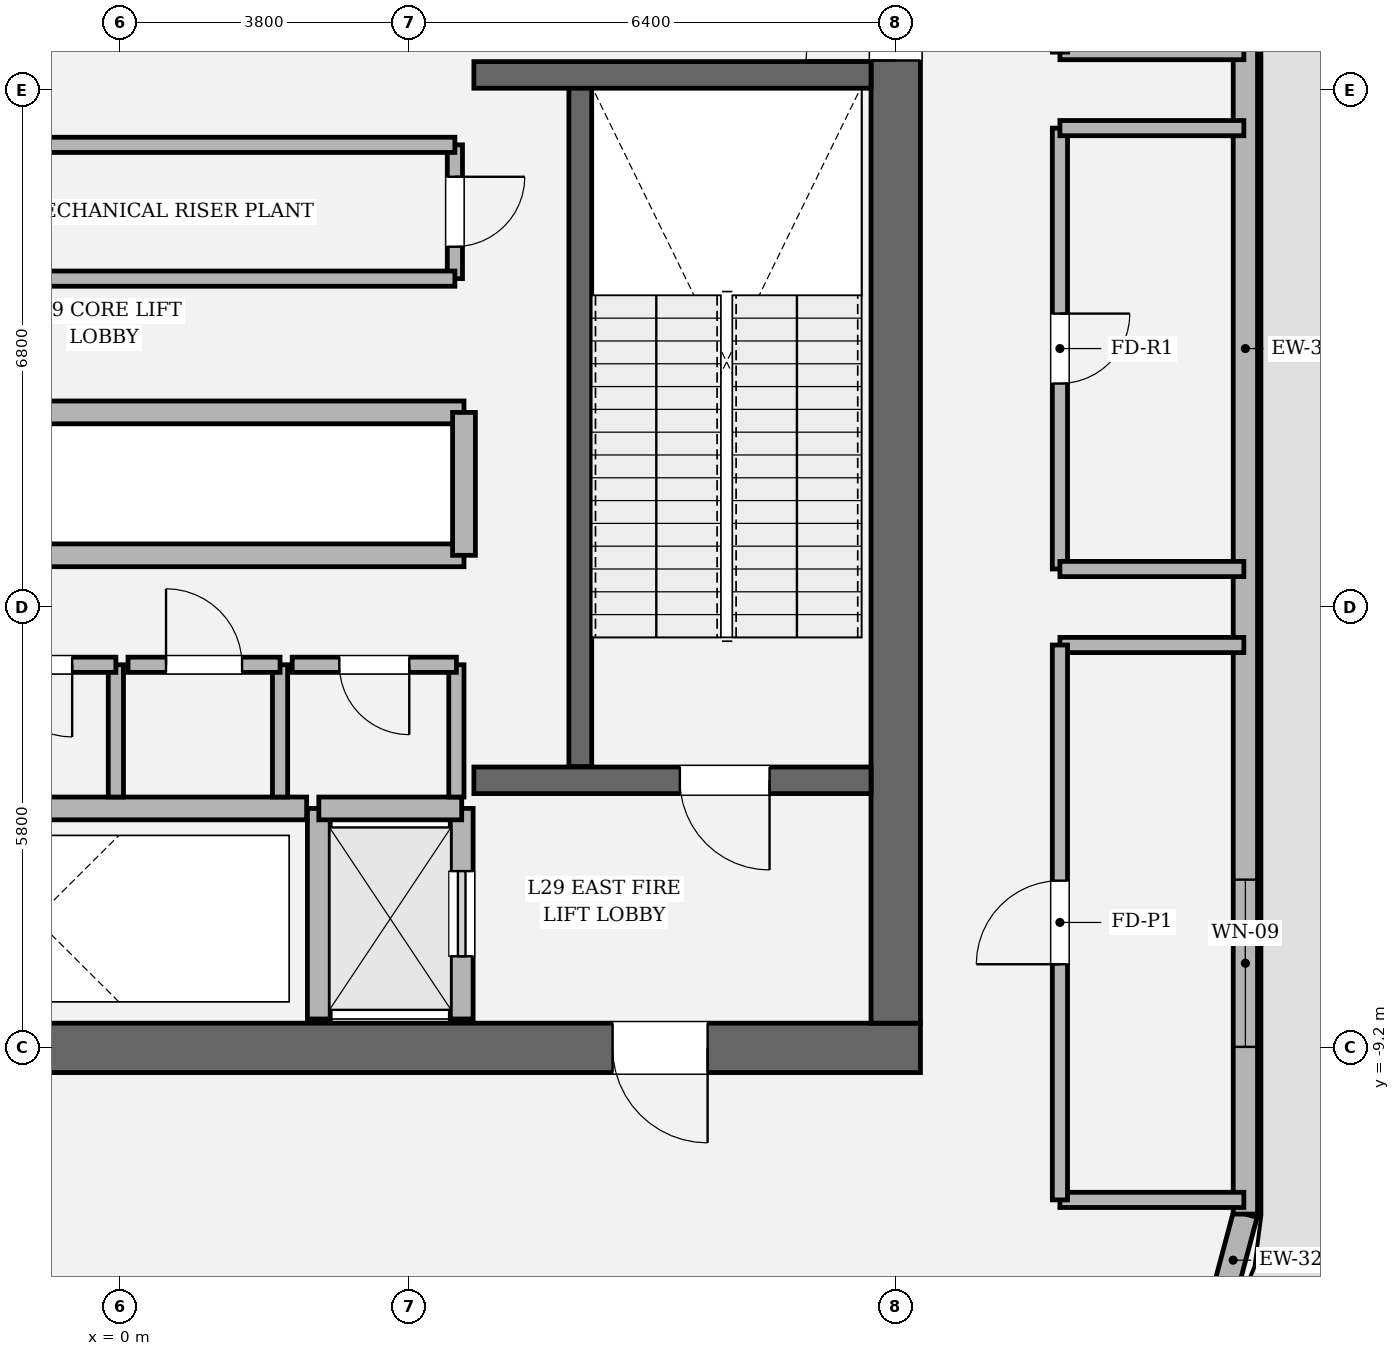
"""IFC4 building model, lengths in metres.
Left out: names, types, materials, properties, quantities, classifications, styles, units other than length and angle.
Written with IfcOpenShell. Run it as: python <this file> out.ifc"""

import sys

from ifc_helpers import new_model, si_unit, direction, frame, frame_2d, origin, place, context, subcontext, project, spatial, rectangle, extrude, element, fill, save


model = new_model("IFC4")
c1 = context("Model", 3, precision=1e-05, world=origin(), true_north=direction((0.0, 1.0)))
c2 = subcontext(c1, "Body", "Model", "MODEL_VIEW")
j1 = project(units=[si_unit("LENGTHUNIT", "METRE"), si_unit("PLANEANGLEUNIT", "RADIAN")], contexts=[c1])
p1 = place(None, origin())
s1 = spatial("IfcSite", under=j1, at=p1, CompositionType="ELEMENT")
p2 = place(p1, origin())
s2 = spatial("IfcBuilding", under=s1, at=p2, CompositionType="ELEMENT")
p3 = place(p2, frame((0.0, 0.0, 125.4)))
s3 = spatial("IfcBuildingStorey", under=s2, at=p3, CompositionType="ELEMENT", Elevation=125.4)
p4 = place(p3, frame((10.525, -9.2, 0.0), z_axis=(0.0, 0.0, 1.0), x_axis=(-1.0, 0.0, 0.0)))
e1 = element("IfcWall", 1, at=p4, inside=s3, PredefinedType="SHEAR", context=c2, shape_type="SweptSolid", body=[
    extrude(rectangle(XDim=21.05, YDim=0.65, at=frame_2d((10.525, 0.0))), origin(), (0.0, 0.0, 1.0), 4.8),
])
p5 = place(p4, frame((2.8, 0.0, 0.0)))
e2 = element("IfcOpeningElement", 2, at=p5, cuts=e1, PredefinedType="OPENING", context=c2, shape_type="SweptSolid", body=[
    extrude(rectangle(XDim=1.25, YDim=2.25, at=frame_2d((0.625, 1.125))), frame((0.0, 0.335, 0.0), z_axis=(0.0, -1.0, 0.0), x_axis=(1.0, 0.0, 0.0)), (0.0, 0.0, 1.0), 0.67),
])
p6 = place(p4, frame((17.0, 0.0, 0.0)))
e3 = element("IfcOpeningElement", 3, at=p6, cuts=e1, PredefinedType="OPENING", context=c2, shape_type="SweptSolid", body=[
    extrude(rectangle(XDim=1.25, YDim=2.25, at=frame_2d((0.625, 1.125))), frame((0.0, 0.335, 0.0), z_axis=(0.0, -1.0, 0.0), x_axis=(1.0, 0.0, 0.0)), (0.0, 0.0, 1.0), 0.67),
])
p7 = place(p3, frame((10.2, 8.875, 0.0), z_axis=(0.0, 0.0, 1.0), x_axis=(0.0, -1.0, 0.0)))
e4 = element("IfcWall", 4, at=p7, inside=s3, PredefinedType="SHEAR", context=c2, shape_type="SweptSolid", body=[
    extrude(rectangle(XDim=17.75, YDim=0.65, at=frame_2d((8.875, 0.0))), origin(), (0.0, 0.0, 1.0), 4.8),
])
p8 = place(p7, frame((3.905, 0.0, 0.0)))
e5 = element("IfcOpeningElement", 5, at=p8, cuts=e4, PredefinedType="OPENING", context=c2, shape_type="SweptSolid", body=[
    extrude(rectangle(XDim=1.18, YDim=2.2, at=frame_2d((0.59, 1.1))), frame((0.0, 0.335, 0.0), z_axis=(0.0, -1.0, 0.0), x_axis=(1.0, 0.0, 0.0)), (0.0, 0.0, 1.0), 0.67),
])
p9 = place(p3, frame((6.05, 3.45, 0.0), z_axis=(0.0, 0.0, 1.0), x_axis=(0.0, -1.0, 0.0)))
e6 = element("IfcWall", 6, at=p9, inside=s3, PredefinedType="SOLIDWALL", context=c2, shape_type="SweptSolid", body=[
    extrude(rectangle(XDim=8.95, YDim=0.3, at=frame_2d((4.475, 0.0))), origin(), (0.0, 0.0, 1.0), 4.8),
])
p10 = place(p3, frame((4.65, -5.68, 0.0), z_axis=(0.0, 0.0, 1.0), x_axis=(1.0, 0.0, 0.0)))
e7 = element("IfcWall", 7, at=p10, inside=s3, PredefinedType="SOLIDWALL", context=c2, shape_type="SweptSolid", body=[
    extrude(rectangle(XDim=5.225, YDim=0.35, at=frame_2d((2.613, 0.0))), origin(), (0.0, 0.0, 1.0), 4.8),
])
p11 = place(p10, frame((2.71, 0.0, 0.0)))
e8 = element("IfcOpeningElement", 8, at=p11, cuts=e7, PredefinedType="OPENING", context=c2, shape_type="SweptSolid", body=[
    extrude(rectangle(XDim=1.18, YDim=2.2, at=frame_2d((0.59, 1.1))), frame((0.0, 0.185, 0.0), z_axis=(0.0, -1.0, 0.0), x_axis=(1.0, 0.0, 0.0)), (0.0, 0.0, 1.0), 0.37),
])
p12 = place(p3, frame((4.65, 3.6, 0.0), z_axis=(0.0, 0.0, 1.0), x_axis=(1.0, 0.0, 0.0)))
e9 = element("IfcWall", 9, at=p12, inside=s3, PredefinedType="SOLIDWALL", context=c2, shape_type="SweptSolid", body=[
    extrude(rectangle(XDim=5.225, YDim=0.35, at=frame_2d((2.613, 0.0))), origin(), (0.0, 0.0, 1.0), 4.8),
])
p13 = place(p3, frame((14.477, -12.599, 0.0), z_axis=(0.0, 0.0, 1.0), x_axis=(0.25748094776, 0.966283375382, 0.0)))
e10 = element("IfcWall", 10, at=p13, inside=s3, PredefinedType="SOLIDWALL", context=c2, shape_type="SweptSolid", body=[
    extrude(rectangle(XDim=1.254, YDim=0.32, at=frame_2d((0.627, 0.0))), origin(), (0.0, 0.0, 1.0), 3.194),
])
p14 = place(p3, frame((14.8, -11.387, 0.0), z_axis=(0.0, 0.0, 1.0), x_axis=(0.0, 1.0, 0.0)))
e11 = element("IfcWall", 11, at=p14, inside=s3, PredefinedType="SOLIDWALL", context=c2, shape_type="SweptSolid", body=[
    extrude(rectangle(XDim=22.774, YDim=0.32, at=frame_2d((11.387, 0.0))), origin(), (0.0, 0.0, 1.0), 3.194),
])
p15 = place(p14, frame((2.2, 0.0, 0.9)))
e12 = element("IfcOpeningElement", 12, at=p15, cuts=e11, PredefinedType="OPENING", context=c2, shape_type="SweptSolid", body=[
    extrude(rectangle(XDim=2.2, YDim=1.2, at=frame_2d((1.1, 0.6))), frame((0.0, 0.17, 0.0), z_axis=(0.0, -1.0, 0.0), x_axis=(1.0, 0.0, 0.0)), (0.0, 0.0, 1.0), 0.34),
])
p16 = place(p14, frame((18.374, 0.0, 0.9)))
e13 = element("IfcOpeningElement", 13, at=p16, cuts=e11, PredefinedType="OPENING", context=c2, shape_type="SweptSolid", body=[
    extrude(rectangle(XDim=2.2, YDim=1.2, at=frame_2d((1.1, 0.6))), frame((0.0, 0.17, 0.0), z_axis=(0.0, -1.0, 0.0), x_axis=(1.0, 0.0, 0.0)), (0.0, 0.0, 1.0), 0.34),
])
p17 = place(p3, frame((4.49, -8.82, 0.0), z_axis=(0.0, 0.0, 1.0), x_axis=(0.0, 1.0, 0.0)))
e14 = element("IfcWall", 14, at=p17, inside=s3, PredefinedType="SOLIDWALL", context=c2, shape_type="SweptSolid", body=[
    extrude(rectangle(XDim=2.77, YDim=0.3, at=frame_2d((1.385, 0.0))), origin(), (0.0, 0.0, 1.0), 4.48),
])
p18 = place(p17, frame((0.825, 0.0, 0.0)))
e15 = element("IfcOpeningElement", 15, at=p18, cuts=e14, PredefinedType="OPENING", context=c2, shape_type="SweptSolid", body=[
    extrude(rectangle(XDim=1.12, YDim=2.25, at=frame_2d((0.56, 1.125))), frame((0.0, 0.16, 0.0), z_axis=(0.0, -1.0, 0.0), x_axis=(1.0, 0.0, 0.0)), (0.0, 0.0, 1.0), 0.32),
])
p19 = place(p3, frame((2.61, -8.82, 0.0), z_axis=(0.0, 0.0, 1.0), x_axis=(0.0, 1.0, 0.0)))
e16 = element("IfcWall", 16, at=p19, inside=s3, PredefinedType="SOLIDWALL", context=c2, shape_type="SweptSolid", body=[
    extrude(rectangle(XDim=2.77, YDim=0.3, at=frame_2d((1.385, 0.0))), origin(), (0.0, 0.0, 1.0), 4.48),
])
p20 = place(p3, frame((2.61, -6.05, 0.0), z_axis=(0.0, 0.0, 1.0), x_axis=(1.0, 0.0, 0.0)))
e17 = element("IfcWall", 17, at=p20, inside=s3, PredefinedType="SOLIDWALL", context=c2, shape_type="SweptSolid", body=[
    extrude(rectangle(XDim=1.88, YDim=0.3, at=frame_2d((0.94, 0.0))), origin(), (0.0, 0.0, 1.0), 4.48),
])
for number, where, z_axis, x_axis in (
    (18, (-4.52, -0.84, 0.0), (0.0, 0.0, 1.0), (1.0, 0.0, 0.0)),
    (19, (-4.52, -2.72, 0.0), (0.0, 0.0, 1.0), (1.0, 0.0, 0.0)),
):
    element("IfcWall", number, at=place(p3, frame(where, z_axis=z_axis, x_axis=x_axis)), inside=s3, PredefinedType="SOLIDWALL", context=c2, shape_type="SweptSolid", body=[
        extrude(rectangle(XDim=9.04, YDim=0.3, at=frame_2d((4.52, 0.0))), origin(), (0.0, 0.0, 1.0), 4.48),
    ])
p21 = place(p3, frame((4.52, -2.72, 0.0), z_axis=(0.0, 0.0, 1.0), x_axis=(0.0, 1.0, 0.0)))
e20 = element("IfcWall", 20, at=p21, inside=s3, PredefinedType="SOLIDWALL", context=c2, shape_type="SweptSolid", body=[
    extrude(rectangle(XDim=1.88, YDim=0.3, at=frame_2d((0.94, 0.0))), origin(), (0.0, 0.0, 1.0), 4.48),
])
p22 = place(p3, frame((-2.45, -6.05, 0.0), z_axis=(0.0, 0.0, 1.0), x_axis=(1.0, 0.0, 0.0)))
e21 = element("IfcWall", 21, at=p22, inside=s3, PredefinedType="SOLIDWALL", context=c2, shape_type="SweptSolid", body=[
    extrude(rectangle(XDim=4.9, YDim=0.3, at=frame_2d((2.45, 0.0))), origin(), (0.0, 0.0, 1.0), 4.48),
])
p23 = place(p3, frame((-0.06, -5.9, 0.0), z_axis=(0.0, 0.0, 1.0), x_axis=(0.0, 1.0, 0.0)))
e22 = element("IfcWall", 22, at=p23, inside=s3, PredefinedType="SOLIDWALL", context=c2, shape_type="SweptSolid", body=[
    extrude(rectangle(XDim=1.74, YDim=0.2, at=frame_2d((0.87, 0.0))), origin(), (0.0, 0.0, 1.0), 4.48),
])
p24 = place(p3, frame((-0.06, -4.16, 0.0), z_axis=(0.0, 0.0, 1.0), x_axis=(-1.0, 0.0, 0.0)))
e23 = element("IfcWall", 23, at=p24, inside=s3, PredefinedType="SOLIDWALL", context=c2, shape_type="SweptSolid", body=[
    extrude(rectangle(XDim=2.1, YDim=0.2, at=frame_2d((1.05, 0.0))), origin(), (0.0, 0.0, 1.0), 4.48),
])
p25 = place(p24, frame((0.575, 0.0, 0.0)))
e24 = element("IfcOpeningElement", 24, at=p25, cuts=e23, PredefinedType="OPENING", context=c2, shape_type="SweptSolid", body=[
    extrude(rectangle(XDim=0.95, YDim=2.15, at=frame_2d((0.475, 1.075))), frame((0.0, 0.11, 0.0), z_axis=(0.0, -1.0, 0.0), x_axis=(1.0, 0.0, 0.0)), (0.0, 0.0, 1.0), 0.22),
])
p26 = place(p3, frame((2.1, -5.9, 0.0), z_axis=(0.0, 0.0, 1.0), x_axis=(0.0, 1.0, 0.0)))
e25 = element("IfcWall", 25, at=p26, inside=s3, PredefinedType="SOLIDWALL", context=c2, shape_type="SweptSolid", body=[
    extrude(rectangle(XDim=1.74, YDim=0.2, at=frame_2d((0.87, 0.0))), origin(), (0.0, 0.0, 1.0), 4.48),
])
p27 = place(p3, frame((2.1, -4.16, 0.0), z_axis=(0.0, 0.0, 1.0), x_axis=(-1.0, 0.0, 0.0)))
e26 = element("IfcWall", 26, at=p27, inside=s3, PredefinedType="SOLIDWALL", context=c2, shape_type="SweptSolid", body=[
    extrude(rectangle(XDim=2.0, YDim=0.2, at=frame_2d((1.0, 0.0))), origin(), (0.0, 0.0, 1.0), 4.48),
])
p28 = place(p27, frame((0.5, 0.0, 0.0)))
e27 = element("IfcOpeningElement", 27, at=p28, cuts=e26, PredefinedType="OPENING", context=c2, shape_type="SweptSolid", body=[
    extrude(rectangle(XDim=1.0, YDim=2.15, at=frame_2d((0.5, 1.075))), frame((0.0, 0.11, 0.0), z_axis=(0.0, -1.0, 0.0), x_axis=(1.0, 0.0, 0.0)), (0.0, 0.0, 1.0), 0.22),
])
p29 = place(p3, frame((4.42, -5.9, 0.0), z_axis=(0.0, 0.0, 1.0), x_axis=(0.0, 1.0, 0.0)))
e28 = element("IfcWall", 28, at=p29, inside=s3, PredefinedType="SOLIDWALL", context=c2, shape_type="SweptSolid", body=[
    extrude(rectangle(XDim=1.74, YDim=0.2, at=frame_2d((0.87, 0.0))), origin(), (0.0, 0.0, 1.0), 4.48),
])
p30 = place(p3, frame((4.42, -4.16, 0.0), z_axis=(0.0, 0.0, 1.0), x_axis=(-1.0, 0.0, 0.0)))
e29 = element("IfcWall", 29, at=p30, inside=s3, PredefinedType="SOLIDWALL", context=c2, shape_type="SweptSolid", body=[
    extrude(rectangle(XDim=2.16, YDim=0.2, at=frame_2d((1.08, 0.0))), origin(), (0.0, 0.0, 1.0), 4.48),
])
p31 = place(p30, frame((0.62, 0.0, 0.0)))
e30 = element("IfcOpeningElement", 30, at=p31, cuts=e29, PredefinedType="OPENING", context=c2, shape_type="SweptSolid", body=[
    extrude(rectangle(XDim=0.92, YDim=2.1, at=frame_2d((0.46, 1.05))), frame((0.0, 0.11, 0.0), z_axis=(0.0, -1.0, 0.0), x_axis=(1.0, 0.0, 0.0)), (0.0, 0.0, 1.0), 0.22),
])
p32 = place(p3, frame((4.4, 0.92, 0.0), z_axis=(0.0, 0.0, 1.0), x_axis=(0.0, 1.0, 0.0)))
e31 = element("IfcWall", 31, at=p32, inside=s3, PredefinedType="SOLIDWALL", context=c2, shape_type="SweptSolid", body=[
    extrude(rectangle(XDim=1.76, YDim=0.2, at=frame_2d((0.88, 0.0))), origin(), (0.0, 0.0, 1.0), 4.48),
])
p33 = place(p32, frame((0.42, 0.0, 0.0)))
e32 = element("IfcOpeningElement", 32, at=p33, cuts=e31, PredefinedType="OPENING", context=c2, shape_type="SweptSolid", body=[
    extrude(rectangle(XDim=0.92, YDim=2.1, at=frame_2d((0.46, 1.05))), frame((0.0, 0.11, 0.0), z_axis=(0.0, -1.0, 0.0), x_axis=(1.0, 0.0, 0.0)), (0.0, 0.0, 1.0), 0.22),
])
for number, where, z_axis, x_axis in (
    (33, (4.4, 2.68, 0.0), (0.0, 0.0, 1.0), (-1.0, 0.0, 0.0)),
    (34, (-4.4, 0.92, 0.0), (0.0, 0.0, 1.0), (1.0, 0.0, 0.0)),
):
    element("IfcWall", number, at=place(p3, frame(where, z_axis=z_axis, x_axis=x_axis)), inside=s3, PredefinedType="SOLIDWALL", context=c2, shape_type="SweptSolid", body=[
        extrude(rectangle(XDim=8.8, YDim=0.2, at=frame_2d((4.4, 0.0))), origin(), (0.0, 0.0, 1.0), 4.48),
    ])
for number, where, z_axis, x_axis in (
    (35, (12.36, -3.9, 0.0), (0.0, 0.0, 1.0), (1.0, 0.0, 0.0)),
    (36, (14.78, -11.2, 0.0), (0.0, 0.0, 1.0), (-1.0, 0.0, 0.0)),
):
    element("IfcWall", number, at=place(p3, frame(where, z_axis=z_axis, x_axis=x_axis)), inside=s3, PredefinedType="SOLIDWALL", context=c2, shape_type="SweptSolid", body=[
        extrude(rectangle(XDim=2.42, YDim=0.2, at=frame_2d((1.21, 0.0))), origin(), (0.0, 0.0, 1.0), 3.194),
    ])
p34 = place(p3, frame((12.36, -11.2, 0.0), z_axis=(0.0, 0.0, 1.0), x_axis=(0.0, 1.0, 0.0)))
e37 = element("IfcWall", 37, at=p34, inside=s3, PredefinedType="SOLIDWALL", context=c2, shape_type="SweptSolid", body=[
    extrude(rectangle(XDim=7.3, YDim=0.2, at=frame_2d((3.65, 0.0))), origin(), (0.0, 0.0, 1.0), 4.48),
])
p35 = place(p34, frame((3.1, 0.0, 0.0)))
e38 = element("IfcOpeningElement", 38, at=p35, cuts=e37, PredefinedType="OPENING", context=c2, shape_type="SweptSolid", body=[
    extrude(rectangle(XDim=1.1, YDim=2.2, at=frame_2d((0.55, 1.1))), frame((0.0, 0.11, 0.0), z_axis=(0.0, -1.0, 0.0), x_axis=(1.0, 0.0, 0.0)), (0.0, 0.0, 1.0), 0.22),
])
p36 = place(p3, frame((12.36, -2.9, 0.0), z_axis=(0.0, 0.0, 1.0), x_axis=(0.0, 1.0, 0.0)))
e39 = element("IfcWall", 39, at=p36, inside=s3, PredefinedType="SOLIDWALL", context=c2, shape_type="SweptSolid", body=[
    extrude(rectangle(XDim=5.8, YDim=0.2, at=frame_2d((2.9, 0.0))), origin(), (0.0, 0.0, 1.0), 4.48),
])
p37 = place(p36, frame((2.44, 0.0, 0.0)))
e40 = element("IfcOpeningElement", 40, at=p37, cuts=e39, PredefinedType="OPENING", context=c2, shape_type="SweptSolid", body=[
    extrude(rectangle(XDim=0.92, YDim=2.1, at=frame_2d((0.46, 1.05))), frame((0.0, 0.11, 0.0), z_axis=(0.0, -1.0, 0.0), x_axis=(1.0, 0.0, 0.0)), (0.0, 0.0, 1.0), 0.22),
])
for number, where, z_axis, x_axis in (
    (41, (12.36, 2.9, 0.0), (0.0, 0.0, 1.0), (1.0, 0.0, 0.0)),
    (42, (14.78, -2.9, 0.0), (0.0, 0.0, 1.0), (-1.0, 0.0, 0.0)),
    (43, (14.78, 3.9, 0.0), (0.0, 0.0, 1.0), (-1.0, 0.0, 0.0)),
):
    element("IfcWall", number, at=place(p3, frame(where, z_axis=z_axis, x_axis=x_axis)), inside=s3, PredefinedType="SOLIDWALL", context=c2, shape_type="SweptSolid", body=[
        extrude(rectangle(XDim=2.42, YDim=0.2, at=frame_2d((1.21, 0.0))), origin(), (0.0, 0.0, 1.0), 3.194),
    ])
p38 = place(p3, frame((12.36, 3.9, 0.0), z_axis=(0.0, 0.0, 1.0), x_axis=(0.0, 1.0, 0.0)))
e44 = element("IfcWall", 44, at=p38, inside=s3, PredefinedType="SOLIDWALL", context=c2, shape_type="SweptSolid", body=[
    extrude(rectangle(XDim=7.3, YDim=0.2, at=frame_2d((3.65, 0.0))), origin(), (0.0, 0.0, 1.0), 4.48),
])
p39 = place(p38, frame((3.1, 0.0, 0.0)))
e45 = element("IfcOpeningElement", 45, at=p39, cuts=e44, PredefinedType="OPENING", context=c2, shape_type="SweptSolid", body=[
    extrude(rectangle(XDim=1.1, YDim=2.2, at=frame_2d((0.55, 1.1))), frame((0.0, 0.11, 0.0), z_axis=(0.0, -1.0, 0.0), x_axis=(1.0, 0.0, 0.0)), (0.0, 0.0, 1.0), 0.22),
])
p40 = place(p15, origin())
e46 = element("IfcWindow", 46, at=p40, inside=s3, PartitioningType="SINGLE_PANEL", PredefinedType="WINDOW", context=c2, shape_type="SweptSolid", body=[
    extrude(rectangle(XDim=2.2, YDim=1.2, at=frame_2d((1.1, 0.6))), frame((0.0, 0.03, 0.0), z_axis=(0.0, -1.0, 0.0), x_axis=(1.0, 0.0, 0.0)), (0.0, 0.0, 1.0), 0.06),
])
fill(e12, e46)
p41 = place(p11, origin())
e47 = element("IfcDoor", 47, at=p41, inside=s3, OperationType="SINGLE_SWING_RIGHT", PredefinedType="DOOR", context=c2, shape_type="SweptSolid", body=[
    extrude(rectangle(XDim=1.18, YDim=2.2, at=frame_2d((0.59, 1.1))), frame((0.0, 0.025, 0.0), z_axis=(0.0, -1.0, 0.0), x_axis=(1.0, 0.0, 0.0)), (0.0, 0.0, 1.0), 0.05),
])
fill(e8, e47)
p42 = place(p5, origin())
e48 = element("IfcDoor", 48, at=p42, inside=s3, OperationType="SINGLE_SWING_LEFT", PredefinedType="DOOR", context=c2, shape_type="SweptSolid", body=[
    extrude(rectangle(XDim=1.25, YDim=2.25, at=frame_2d((0.625, 1.125))), frame((0.0, 0.025, 0.0), z_axis=(0.0, -1.0, 0.0), x_axis=(1.0, 0.0, 0.0)), (0.0, 0.0, 1.0), 0.05),
])
fill(e2, e48)
p43 = place(p8, origin())
e49 = element("IfcDoor", 49, at=p43, inside=s3, OperationType="SINGLE_SWING_RIGHT", PredefinedType="DOOR", context=c2, shape_type="SweptSolid", body=[
    extrude(rectangle(XDim=1.18, YDim=2.2, at=frame_2d((0.59, 1.1))), frame((0.0, 0.025, 0.0), z_axis=(0.0, -1.0, 0.0), x_axis=(1.0, 0.0, 0.0)), (0.0, 0.0, 1.0), 0.05),
])
fill(e5, e49)
p44 = place(p18, origin())
e50 = element("IfcDoor", 50, at=p44, inside=s3, OperationType="SLIDING_TO_RIGHT", PredefinedType="DOOR", context=c2, shape_type="SweptSolid", body=[
    extrude(rectangle(XDim=1.12, YDim=2.25, at=frame_2d((0.56, 1.125))), frame((0.0, 0.025, 0.0), z_axis=(0.0, -1.0, 0.0), x_axis=(1.0, 0.0, 0.0)), (0.0, 0.0, 1.0), 0.05),
])
fill(e15, e50)
p45 = place(p25, origin())
e51 = element("IfcDoor", 51, at=p45, inside=s3, OperationType="SINGLE_SWING_LEFT", PredefinedType="DOOR", context=c2, shape_type="SweptSolid", body=[
    extrude(rectangle(XDim=0.95, YDim=2.15, at=frame_2d((0.475, 1.075))), frame((0.0, 0.025, 0.0), z_axis=(0.0, -1.0, 0.0), x_axis=(1.0, 0.0, 0.0)), (0.0, 0.0, 1.0), 0.05),
])
fill(e24, e51)
p46 = place(p28, origin())
e52 = element("IfcDoor", 52, at=p46, inside=s3, OperationType="SINGLE_SWING_RIGHT", PredefinedType="DOOR", context=c2, shape_type="SweptSolid", body=[
    extrude(rectangle(XDim=1.0, YDim=2.15, at=frame_2d((0.5, 1.075))), frame((0.0, 0.025, 0.0), z_axis=(0.0, -1.0, 0.0), x_axis=(1.0, 0.0, 0.0)), (0.0, 0.0, 1.0), 0.05),
])
fill(e27, e52)
p47 = place(p31, origin())
e53 = element("IfcDoor", 53, at=p47, inside=s3, OperationType="SINGLE_SWING_LEFT", PredefinedType="DOOR", context=c2, shape_type="SweptSolid", body=[
    extrude(rectangle(XDim=0.92, YDim=2.1, at=frame_2d((0.46, 1.05))), frame((0.0, 0.025, 0.0), z_axis=(0.0, -1.0, 0.0), x_axis=(1.0, 0.0, 0.0)), (0.0, 0.0, 1.0), 0.05),
])
fill(e30, e53)
p48 = place(p33, origin())
e54 = element("IfcDoor", 54, at=p48, inside=s3, OperationType="SINGLE_SWING_RIGHT", PredefinedType="DOOR", context=c2, shape_type="SweptSolid", body=[
    extrude(rectangle(XDim=0.92, YDim=2.1, at=frame_2d((0.46, 1.05))), frame((0.0, 0.025, 0.0), z_axis=(0.0, -1.0, 0.0), x_axis=(1.0, 0.0, 0.0)), (0.0, 0.0, 1.0), 0.05),
])
fill(e32, e54)
p49 = place(p35, origin())
e55 = element("IfcDoor", 55, at=p49, inside=s3, OperationType="SINGLE_SWING_LEFT", PredefinedType="DOOR", context=c2, shape_type="SweptSolid", body=[
    extrude(rectangle(XDim=1.1, YDim=2.2, at=frame_2d((0.55, 1.1))), frame((0.0, 0.025, 0.0), z_axis=(0.0, -1.0, 0.0), x_axis=(1.0, 0.0, 0.0)), (0.0, 0.0, 1.0), 0.05),
])
fill(e38, e55)
p50 = place(p37, origin())
e56 = element("IfcDoor", 56, at=p50, inside=s3, OperationType="SINGLE_SWING_RIGHT", PredefinedType="DOOR", context=c2, shape_type="SweptSolid", body=[
    extrude(rectangle(XDim=0.92, YDim=2.1, at=frame_2d((0.46, 1.05))), frame((0.0, 0.025, 0.0), z_axis=(0.0, -1.0, 0.0), x_axis=(1.0, 0.0, 0.0)), (0.0, 0.0, 1.0), 0.05),
])
fill(e40, e56)
save(model, sys.argv[1])
